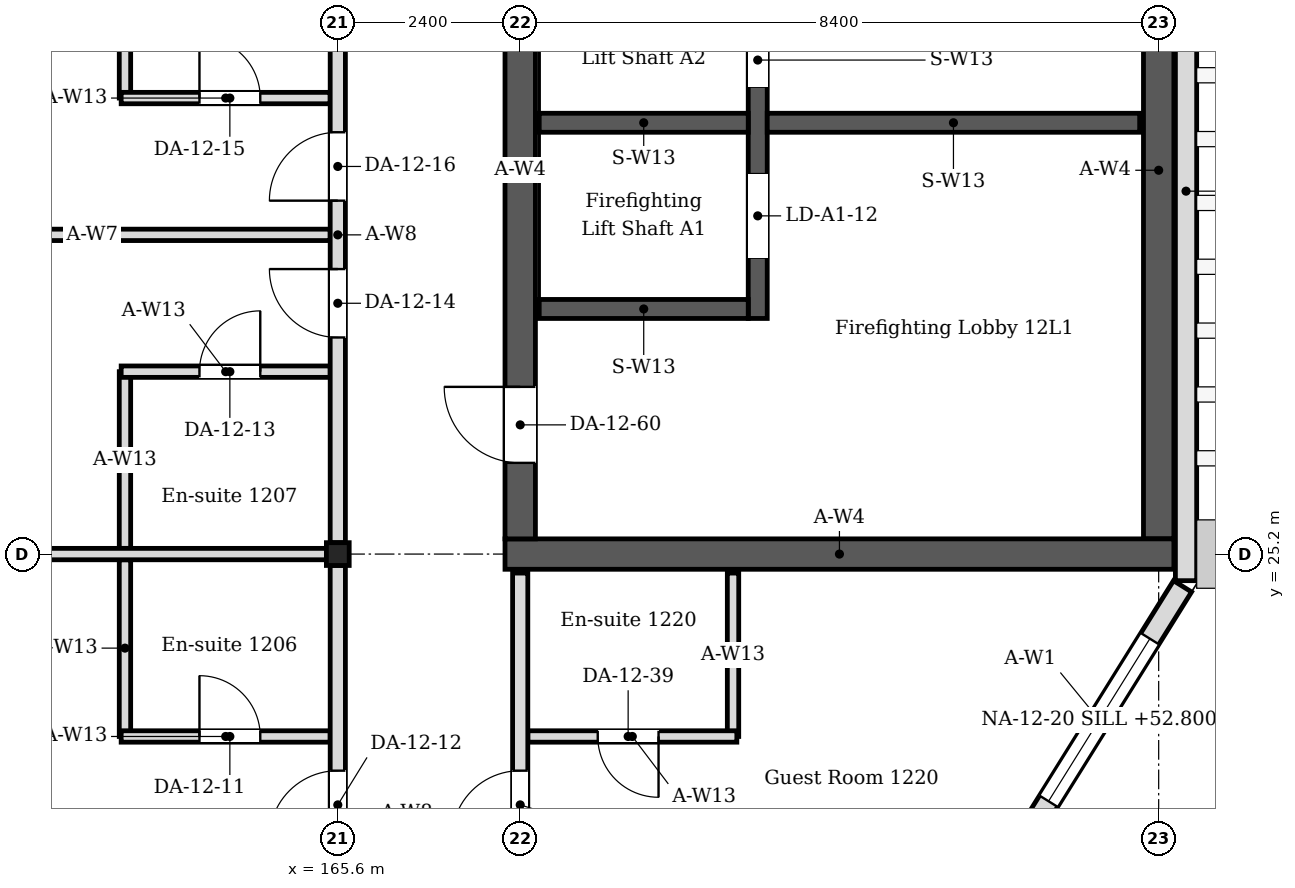
"""IFC4 building model, lengths in metres.
Left out: names, types, materials, properties, quantities, classifications, styles, units other than length and angle.
Written with IfcOpenShell. Run it as: python <this file> out.ifc"""

import sys

from ifc_helpers import new_model, si_unit, direction, frame, frame_2d, origin, origin_2d, place, context, subcontext, project, spatial, rectangle, i_section, extrude, element, fill, save


model = new_model("IFC4")
c1 = context("Model", 3, precision=1e-05, world=origin(), true_north=direction((0.0, 1.0)))
c2 = subcontext(c1, "Body", "Model", "MODEL_VIEW")
j1 = project(units=[si_unit("LENGTHUNIT", "METRE"), si_unit("PLANEANGLEUNIT", "RADIAN")], contexts=[c1])
p1 = place(None, origin())
s1 = spatial("IfcSite", under=j1, at=p1, CompositionType="ELEMENT")
p2 = place(p1, origin())
s2 = spatial("IfcBuilding", under=s1, at=p2, CompositionType="ELEMENT")
p3 = place(p2, frame((0.0, 0.0, 52.2)))
s3 = spatial("IfcBuildingStorey", under=s2, at=p3, CompositionType="ELEMENT", Elevation=52.2)
p4 = place(p3, frame((165.6, 25.2, 0.0), z_axis=(0.0, 0.0, 1.0), x_axis=(1.0, 0.0, 0.0)))
e1 = element("IfcColumn", 1, at=p4, inside=s3, PredefinedType="COLUMN", context=c2, shape_type="SweptSolid", body=[
    extrude(i_section(OverallWidth=0.3, OverallDepth=0.3, WebThickness=0.01, FlangeThickness=0.015, FilletRadius=0.013, at=origin_2d()), origin(), (0.0, 0.0, 1.0), 4.2),
])
p5 = place(p3, frame((167.8, 25.2, 0.0), z_axis=(0.0, 0.0, 1.0), x_axis=(1.0, 0.0, 0.0)))
e2 = element("IfcWall", 2, at=p5, inside=s3, PredefinedType="SOLIDWALL", context=c2, shape_type="SweptSolid", body=[
    extrude(rectangle(XDim=8.8, YDim=0.4, at=frame_2d((4.4, 0.0))), origin(), (0.0, 0.0, 1.0), 4.05),
])
p6 = place(p3, frame((168.0, 25.4, 0.0), z_axis=(0.0, 0.0, 1.0), x_axis=(0.0, 1.0, 0.0)))
e3 = element("IfcWall", 3, at=p6, inside=s3, PredefinedType="SOLIDWALL", context=c2, shape_type="SweptSolid", body=[
    extrude(rectangle(XDim=16.4, YDim=0.4, at=frame_2d((8.2, 0.0))), origin(), (0.0, 0.0, 1.0), 4.05),
])
p7 = place(p6, frame((1.0, 0.0, 0.0)))
e4 = element("IfcOpeningElement", 4, at=p7, cuts=e3, PredefinedType="OPENING", context=c2, shape_type="SweptSolid", body=[
    extrude(rectangle(XDim=1.0, YDim=2.1, at=frame_2d((0.5, 1.05))), frame((0.0, 0.21, 0.0), z_axis=(0.0, -1.0, 0.0), x_axis=(1.0, 0.0, 0.0)), (0.0, 0.0, 1.0), 0.42),
])
p8 = place(p6, frame((14.4, 0.0, 0.0)))
e5 = element("IfcOpeningElement", 5, at=p8, cuts=e3, PredefinedType="OPENING", context=c2, shape_type="SweptSolid", body=[
    extrude(rectangle(XDim=1.4, YDim=2.1, at=frame_2d((0.7, 1.05))), frame((0.0, 0.21, 0.0), z_axis=(0.0, -1.0, 0.0), x_axis=(1.0, 0.0, 0.0)), (0.0, 0.0, 1.0), 0.42),
])
p9 = place(p3, frame((176.4, 25.4, 0.0), z_axis=(0.0, 0.0, 1.0), x_axis=(0.0, 1.0, 0.0)))
e6 = element("IfcWall", 6, at=p9, inside=s3, PredefinedType="SOLIDWALL", context=c2, shape_type="SweptSolid", body=[
    extrude(rectangle(XDim=16.4, YDim=0.4, at=frame_2d((8.2, 0.0))), origin(), (0.0, 0.0, 1.0), 4.05),
])
p10 = place(p3, frame((174.521, 21.259, 0.0), z_axis=(0.0, 0.0, 1.0), x_axis=(0.529018946142, 0.848610013271, 0.0)))
e7 = element("IfcWall", 7, at=p10, inside=s3, PredefinedType="SOLIDWALL", context=c2, shape_type="SweptSolid", body=[
    extrude(rectangle(XDim=4.144, YDim=0.28, at=frame_2d((2.072, 0.0))), origin(), (0.0, 0.0, 1.0), 4.05),
])
p11 = place(p10, frame((0.812, 0.0, 0.6)))
e8 = element("IfcOpeningElement", 8, at=p11, cuts=e7, PredefinedType="OPENING", context=c2, shape_type="SweptSolid", body=[
    extrude(rectangle(XDim=2.52, YDim=2.4, at=frame_2d((1.26, 1.2))), frame((0.0, 0.15, 0.0), z_axis=(0.0, -1.0, 0.0), x_axis=(1.0, 0.0, 0.0)), (0.0, 0.0, 1.0), 0.3),
])
p12 = place(p3, frame((176.76, 24.85, 0.0), z_axis=(0.0, 0.0, 1.0), x_axis=(0.0, 1.0, 0.0)))
e9 = element("IfcWall", 9, at=p12, inside=s3, PredefinedType="SOLIDWALL", context=c2, shape_type="SweptSolid", body=[
    extrude(rectangle(XDim=42.57, YDim=0.28, at=frame_2d((21.285, 0.0))), origin(), (0.0, 0.0, 1.0), 4.05),
])
p13 = place(p12, frame((17.99, 0.0, 0.6)))
e10 = element("IfcOpeningElement", 10, at=p13, cuts=e9, PredefinedType="OPENING", context=c2, shape_type="SweptSolid", body=[
    extrude(rectangle(XDim=2.52, YDim=2.4, at=frame_2d((1.26, 1.2))), frame((0.0, 0.15, 0.0), z_axis=(0.0, -1.0, 0.0), x_axis=(1.0, 0.0, 0.0)), (0.0, 0.0, 1.0), 0.3),
])
p14 = place(p12, frame((22.19, 0.0, 0.6)))
e11 = element("IfcOpeningElement", 11, at=p14, cuts=e9, PredefinedType="OPENING", context=c2, shape_type="SweptSolid", body=[
    extrude(rectangle(XDim=2.52, YDim=2.4, at=frame_2d((1.26, 1.2))), frame((0.0, 0.15, 0.0), z_axis=(0.0, -1.0, 0.0), x_axis=(1.0, 0.0, 0.0)), (0.0, 0.0, 1.0), 0.3),
])
p15 = place(p12, frame((25.97, 0.0, 0.6)))
e12 = element("IfcOpeningElement", 12, at=p15, cuts=e9, PredefinedType="OPENING", context=c2, shape_type="SweptSolid", body=[
    extrude(rectangle(XDim=2.52, YDim=2.4, at=frame_2d((1.26, 1.2))), frame((0.0, 0.15, 0.0), z_axis=(0.0, -1.0, 0.0), x_axis=(1.0, 0.0, 0.0)), (0.0, 0.0, 1.0), 0.3),
])
p16 = place(p12, frame((30.17, 0.0, 0.45)))
e13 = element("IfcOpeningElement", 13, at=p16, cuts=e9, PredefinedType="OPENING", context=c2, shape_type="SweptSolid", body=[
    extrude(rectangle(XDim=2.52, YDim=2.1, at=frame_2d((1.26, 1.05))), frame((0.0, 0.15, 0.0), z_axis=(0.0, -1.0, 0.0), x_axis=(1.0, 0.0, 0.0)), (0.0, 0.0, 1.0), 0.3),
])
p17 = place(p3, frame((162.8, 22.8, 0.0), z_axis=(0.0, 0.0, 1.0), x_axis=(0.0, 1.0, 0.0)))
e14 = element("IfcWall", 14, at=p17, inside=s3, PredefinedType="PARTITIONING", context=c2, shape_type="SweptSolid", body=[
    extrude(rectangle(XDim=2.325, YDim=0.15, at=frame_2d((1.163, 0.0))), origin(), (0.0, 0.0, 1.0), 4.05),
])
p18 = place(p3, frame((162.75, 22.8, 0.0), z_axis=(0.0, 0.0, 1.0), x_axis=(1.0, 0.0, 0.0)))
e15 = element("IfcWall", 15, at=p18, inside=s3, PredefinedType="PARTITIONING", context=c2, shape_type="SweptSolid", body=[
    extrude(rectangle(XDim=2.75, YDim=0.15, at=frame_2d((1.375, 0.0))), origin(), (0.0, 0.0, 1.0), 4.05),
])
p19 = place(p18, frame((1.03, 0.0, 0.0)))
e16 = element("IfcOpeningElement", 16, at=p19, cuts=e15, PredefinedType="OPENING", context=c2, shape_type="SweptSolid", body=[
    extrude(rectangle(XDim=0.8, YDim=2.1, at=frame_2d((0.4, 1.05))), frame((0.0, 0.085, 0.0), z_axis=(0.0, -1.0, 0.0), x_axis=(1.0, 0.0, 0.0)), (0.0, 0.0, 1.0), 0.17),
])
p20 = place(p3, frame((162.8, 25.275, 0.0), z_axis=(0.0, 0.0, 1.0), x_axis=(0.0, 1.0, 0.0)))
e17 = element("IfcWall", 17, at=p20, inside=s3, PredefinedType="PARTITIONING", context=c2, shape_type="SweptSolid", body=[
    extrude(rectangle(XDim=2.325, YDim=0.15, at=frame_2d((1.163, 0.0))), origin(), (0.0, 0.0, 1.0), 4.05),
])
p21 = place(p3, frame((162.75, 27.6, 0.0), z_axis=(0.0, 0.0, 1.0), x_axis=(1.0, 0.0, 0.0)))
e18 = element("IfcWall", 18, at=p21, inside=s3, PredefinedType="PARTITIONING", context=c2, shape_type="SweptSolid", body=[
    extrude(rectangle(XDim=2.75, YDim=0.15, at=frame_2d((1.375, 0.0))), origin(), (0.0, 0.0, 1.0), 4.05),
])
p22 = place(p21, frame((1.03, 0.0, 0.0)))
e19 = element("IfcOpeningElement", 19, at=p22, cuts=e18, PredefinedType="OPENING", context=c2, shape_type="SweptSolid", body=[
    extrude(rectangle(XDim=0.8, YDim=2.1, at=frame_2d((0.4, 1.05))), frame((0.0, 0.085, 0.0), z_axis=(0.0, -1.0, 0.0), x_axis=(1.0, 0.0, 0.0)), (0.0, 0.0, 1.0), 0.17),
])
p23 = place(p3, frame((162.8, 31.2, 0.0), z_axis=(0.0, 0.0, 1.0), x_axis=(0.0, 1.0, 0.0)))
e20 = element("IfcWall", 20, at=p23, inside=s3, PredefinedType="PARTITIONING", context=c2, shape_type="SweptSolid", body=[
    extrude(rectangle(XDim=2.325, YDim=0.15, at=frame_2d((1.163, 0.0))), origin(), (0.0, 0.0, 1.0), 4.05),
])
p24 = place(p3, frame((162.75, 31.2, 0.0), z_axis=(0.0, 0.0, 1.0), x_axis=(1.0, 0.0, 0.0)))
e21 = element("IfcWall", 21, at=p24, inside=s3, PredefinedType="PARTITIONING", context=c2, shape_type="SweptSolid", body=[
    extrude(rectangle(XDim=2.75, YDim=0.15, at=frame_2d((1.375, 0.0))), origin(), (0.0, 0.0, 1.0), 4.05),
])
p25 = place(p24, frame((1.03, 0.0, 0.0)))
e22 = element("IfcOpeningElement", 22, at=p25, cuts=e21, PredefinedType="OPENING", context=c2, shape_type="SweptSolid", body=[
    extrude(rectangle(XDim=0.8, YDim=2.1, at=frame_2d((0.4, 1.05))), frame((0.0, 0.085, 0.0), z_axis=(0.0, -1.0, 0.0), x_axis=(1.0, 0.0, 0.0)), (0.0, 0.0, 1.0), 0.17),
])
p26 = place(p3, frame((170.8, 22.8, 0.0), z_axis=(0.0, 0.0, 1.0), x_axis=(0.0, 1.0, 0.0)))
e23 = element("IfcWall", 23, at=p26, inside=s3, PredefinedType="PARTITIONING", context=c2, shape_type="SweptSolid", body=[
    extrude(rectangle(XDim=2.15, YDim=0.15, at=frame_2d((1.075, 0.0))), origin(), (0.0, 0.0, 1.0), 4.05),
])
p27 = place(p3, frame((170.85, 22.8, 0.0), z_axis=(0.0, 0.0, 1.0), x_axis=(-1.0, 0.0, 0.0)))
e24 = element("IfcWall", 24, at=p27, inside=s3, PredefinedType="PARTITIONING", context=c2, shape_type="SweptSolid", body=[
    extrude(rectangle(XDim=2.75, YDim=0.15, at=frame_2d((1.375, 0.0))), origin(), (0.0, 0.0, 1.0), 4.05),
])
p28 = place(p27, frame((1.03, 0.0, 0.0)))
e25 = element("IfcOpeningElement", 25, at=p28, cuts=e24, PredefinedType="OPENING", context=c2, shape_type="SweptSolid", body=[
    extrude(rectangle(XDim=0.8, YDim=2.1, at=frame_2d((0.4, 1.05))), frame((0.0, 0.085, 0.0), z_axis=(0.0, -1.0, 0.0), x_axis=(1.0, 0.0, 0.0)), (0.0, 0.0, 1.0), 0.17),
])
p29 = place(p3, frame((157.35, 25.2, 0.0), z_axis=(0.0, 0.0, 1.0), x_axis=(1.0, 0.0, 0.0)))
e26 = element("IfcWall", 26, at=p29, inside=s3, PredefinedType="PARTITIONING", context=c2, shape_type="SweptSolid", body=[
    extrude(rectangle(XDim=8.1, YDim=0.15, at=frame_2d((4.05, 0.0))), origin(), (0.0, 0.0, 1.0), 3.604),
])
p30 = place(p3, frame((159.24, 29.4, 0.0), z_axis=(0.0, 0.0, 1.0), x_axis=(1.0, 0.0, 0.0)))
e27 = element("IfcWall", 27, at=p30, inside=s3, PredefinedType="PARTITIONING", context=c2, shape_type="SweptSolid", body=[
    extrude(rectangle(XDim=6.26, YDim=0.15, at=frame_2d((3.13, 0.0))), origin(), (0.0, 0.0, 1.0), 3.604),
])
p31 = place(p3, frame((165.6, 16.95, 0.0), z_axis=(0.0, 0.0, 1.0), x_axis=(0.0, 1.0, 0.0)))
e28 = element("IfcWall", 28, at=p31, inside=s3, PredefinedType="PARTITIONING", context=c2, shape_type="SweptSolid", body=[
    extrude(rectangle(XDim=8.1, YDim=0.2, at=frame_2d((4.05, 0.0))), origin(), (0.0, 0.0, 1.0), 3.45),
])
p32 = place(p31, frame((2.7, 0.0, 0.0)))
e29 = element("IfcOpeningElement", 29, at=p32, cuts=e28, PredefinedType="OPENING", context=c2, shape_type="SweptSolid", body=[
    extrude(rectangle(XDim=0.9, YDim=2.1, at=frame_2d((0.45, 1.05))), frame((0.0, 0.11, 0.0), z_axis=(0.0, -1.0, 0.0), x_axis=(1.0, 0.0, 0.0)), (0.0, 0.0, 1.0), 0.22),
])
p33 = place(p31, frame((4.5, 0.0, 0.0)))
e30 = element("IfcOpeningElement", 30, at=p33, cuts=e28, PredefinedType="OPENING", context=c2, shape_type="SweptSolid", body=[
    extrude(rectangle(XDim=0.9, YDim=2.1, at=frame_2d((0.45, 1.05))), frame((0.0, 0.11, 0.0), z_axis=(0.0, -1.0, 0.0), x_axis=(1.0, 0.0, 0.0)), (0.0, 0.0, 1.0), 0.22),
])
p34 = place(p3, frame((165.6, 25.35, 0.0), z_axis=(0.0, 0.0, 1.0), x_axis=(0.0, 1.0, 0.0)))
e31 = element("IfcWall", 31, at=p34, inside=s3, PredefinedType="PARTITIONING", context=c2, shape_type="SweptSolid", body=[
    extrude(rectangle(XDim=8.1, YDim=0.2, at=frame_2d((4.05, 0.0))), origin(), (0.0, 0.0, 1.0), 3.45),
])
p35 = place(p34, frame((2.7, 0.0, 0.0)))
e32 = element("IfcOpeningElement", 32, at=p35, cuts=e31, PredefinedType="OPENING", context=c2, shape_type="SweptSolid", body=[
    extrude(rectangle(XDim=0.9, YDim=2.1, at=frame_2d((0.45, 1.05))), frame((0.0, 0.11, 0.0), z_axis=(0.0, -1.0, 0.0), x_axis=(1.0, 0.0, 0.0)), (0.0, 0.0, 1.0), 0.22),
])
p36 = place(p34, frame((4.5, 0.0, 0.0)))
e33 = element("IfcOpeningElement", 33, at=p36, cuts=e31, PredefinedType="OPENING", context=c2, shape_type="SweptSolid", body=[
    extrude(rectangle(XDim=0.9, YDim=2.1, at=frame_2d((0.45, 1.05))), frame((0.0, 0.11, 0.0), z_axis=(0.0, -1.0, 0.0), x_axis=(1.0, 0.0, 0.0)), (0.0, 0.0, 1.0), 0.22),
])
p37 = place(p3, frame((168.0, 16.95, 0.0), z_axis=(0.0, 0.0, 1.0), x_axis=(0.0, 1.0, 0.0)))
e34 = element("IfcWall", 34, at=p37, inside=s3, PredefinedType="PARTITIONING", context=c2, shape_type="SweptSolid", body=[
    extrude(rectangle(XDim=8.0, YDim=0.2, at=frame_2d((4.0, 0.0))), origin(), (0.0, 0.0, 1.0), 3.45),
])
p38 = place(p37, frame((2.7, 0.0, 0.0)))
e35 = element("IfcOpeningElement", 35, at=p38, cuts=e34, PredefinedType="OPENING", context=c2, shape_type="SweptSolid", body=[
    extrude(rectangle(XDim=0.9, YDim=2.1, at=frame_2d((0.45, 1.05))), frame((0.0, 0.11, 0.0), z_axis=(0.0, -1.0, 0.0), x_axis=(1.0, 0.0, 0.0)), (0.0, 0.0, 1.0), 0.22),
])
p39 = place(p37, frame((4.5, 0.0, 0.0)))
e36 = element("IfcOpeningElement", 36, at=p39, cuts=e34, PredefinedType="OPENING", context=c2, shape_type="SweptSolid", body=[
    extrude(rectangle(XDim=0.9, YDim=2.1, at=frame_2d((0.45, 1.05))), frame((0.0, 0.11, 0.0), z_axis=(0.0, -1.0, 0.0), x_axis=(1.0, 0.0, 0.0)), (0.0, 0.0, 1.0), 0.22),
])
p40 = place(p3, frame((171.125, 28.3, 0.0), z_axis=(0.0, 0.0, 1.0), x_axis=(0.0, 1.0, 0.0)))
e37 = element("IfcWall", 37, at=p40, inside=s3, PredefinedType="SOLIDWALL", context=c2, shape_type="SweptSolid", body=[
    extrude(rectangle(XDim=10.9, YDim=0.25, at=frame_2d((5.45, 0.0))), origin(), (0.0, 0.0, 1.0), 4.05),
])
p41 = place(p40, frame((0.8, 0.0, 0.0)))
e38 = element("IfcOpeningElement", 38, at=p41, cuts=e37, PredefinedType="OPENING", context=c2, shape_type="SweptSolid", body=[
    extrude(rectangle(XDim=1.1, YDim=2.1, at=frame_2d((0.55, 1.05))), frame((0.0, 0.135, 0.0), z_axis=(0.0, -1.0, 0.0), x_axis=(1.0, 0.0, 0.0)), (0.0, 0.0, 1.0), 0.27),
])
p42 = place(p40, frame((3.05, 0.0, 0.0)))
e39 = element("IfcOpeningElement", 39, at=p42, cuts=e37, PredefinedType="OPENING", context=c2, shape_type="SweptSolid", body=[
    extrude(rectangle(XDim=1.1, YDim=2.1, at=frame_2d((0.55, 1.05))), frame((0.0, 0.135, 0.0), z_axis=(0.0, -1.0, 0.0), x_axis=(1.0, 0.0, 0.0)), (0.0, 0.0, 1.0), 0.27),
])
p43 = place(p40, frame((5.1, 0.0, 0.0)))
e40 = element("IfcOpeningElement", 40, at=p43, cuts=e37, PredefinedType="OPENING", context=c2, shape_type="SweptSolid", body=[
    extrude(rectangle(XDim=1.1, YDim=2.1, at=frame_2d((0.55, 1.05))), frame((0.0, 0.135, 0.0), z_axis=(0.0, -1.0, 0.0), x_axis=(1.0, 0.0, 0.0)), (0.0, 0.0, 1.0), 0.27),
])
p44 = place(p40, frame((7.15, 0.0, 0.0)))
e41 = element("IfcOpeningElement", 41, at=p44, cuts=e37, PredefinedType="OPENING", context=c2, shape_type="SweptSolid", body=[
    extrude(rectangle(XDim=1.1, YDim=2.1, at=frame_2d((0.55, 1.05))), frame((0.0, 0.135, 0.0), z_axis=(0.0, -1.0, 0.0), x_axis=(1.0, 0.0, 0.0)), (0.0, 0.0, 1.0), 0.27),
])
p45 = place(p40, frame((9.2, 0.0, 0.0)))
e42 = element("IfcOpeningElement", 42, at=p45, cuts=e37, PredefinedType="OPENING", context=c2, shape_type="SweptSolid", body=[
    extrude(rectangle(XDim=1.1, YDim=2.1, at=frame_2d((0.55, 1.05))), frame((0.0, 0.135, 0.0), z_axis=(0.0, -1.0, 0.0), x_axis=(1.0, 0.0, 0.0)), (0.0, 0.0, 1.0), 0.27),
])
for number, where, z_axis, x_axis in (
    (43, (168.25, 28.425, 0.0), (0.0, 0.0, 1.0), (1.0, 0.0, 0.0)),
    (44, (168.25, 30.875, 0.0), (0.0, 0.0, 1.0), (1.0, 0.0, 0.0)),
):
    element("IfcWall", number, at=place(p3, frame(where, z_axis=z_axis, x_axis=x_axis)), inside=s3, PredefinedType="SOLIDWALL", context=c2, shape_type="SweptSolid", body=[
        extrude(rectangle(XDim=2.75, YDim=0.25, at=frame_2d((1.375, 0.0))), origin(), (0.0, 0.0, 1.0), 4.05),
    ])
p46 = place(p3, frame((171.25, 30.875, 0.0), z_axis=(0.0, 0.0, 1.0), x_axis=(1.0, 0.0, 0.0)))
e45 = element("IfcWall", 45, at=p46, inside=s3, PredefinedType="SOLIDWALL", context=c2, shape_type="SweptSolid", body=[
    extrude(rectangle(XDim=4.9, YDim=0.25, at=frame_2d((2.45, 0.0))), origin(), (0.0, 0.0, 1.0), 4.05),
])
p47 = place(p11, origin())
e46 = element("IfcWindow", 46, at=p47, inside=s3, PartitioningType="SINGLE_PANEL", PredefinedType="WINDOW", context=c2, shape_type="SweptSolid", body=[
    extrude(rectangle(XDim=2.52, YDim=2.4, at=frame_2d((1.26, 1.2))), frame((0.0, 0.03, 0.0), z_axis=(0.0, -1.0, 0.0), x_axis=(1.0, 0.0, 0.0)), (0.0, 0.0, 1.0), 0.06),
])
fill(e8, e46)
p48 = place(p19, origin())
e47 = element("IfcDoor", 47, at=p48, inside=s3, OperationType="SINGLE_SWING_LEFT", PredefinedType="DOOR", context=c2, shape_type="SweptSolid", body=[
    extrude(rectangle(XDim=0.8, YDim=2.1, at=frame_2d((0.4, 1.05))), frame((0.0, 0.025, 0.0), z_axis=(0.0, -1.0, 0.0), x_axis=(1.0, 0.0, 0.0)), (0.0, 0.0, 1.0), 0.05),
])
fill(e16, e47)
p49 = place(p33, origin())
e48 = element("IfcDoor", 48, at=p49, inside=s3, OperationType="SINGLE_SWING_LEFT", PredefinedType="DOOR", context=c2, shape_type="SweptSolid", body=[
    extrude(rectangle(XDim=0.9, YDim=2.1, at=frame_2d((0.45, 1.05))), frame((0.0, 0.025, 0.0), z_axis=(0.0, -1.0, 0.0), x_axis=(1.0, 0.0, 0.0)), (0.0, 0.0, 1.0), 0.05),
])
fill(e30, e48)
p50 = place(p22, origin())
e49 = element("IfcDoor", 49, at=p50, inside=s3, OperationType="SINGLE_SWING_RIGHT", PredefinedType="DOOR", context=c2, shape_type="SweptSolid", body=[
    extrude(rectangle(XDim=0.8, YDim=2.1, at=frame_2d((0.4, 1.05))), frame((0.0, 0.025, 0.0), z_axis=(0.0, -1.0, 0.0), x_axis=(1.0, 0.0, 0.0)), (0.0, 0.0, 1.0), 0.05),
])
fill(e19, e49)
p51 = place(p35, origin())
e50 = element("IfcDoor", 50, at=p51, inside=s3, OperationType="SINGLE_SWING_RIGHT", PredefinedType="DOOR", context=c2, shape_type="SweptSolid", body=[
    extrude(rectangle(XDim=0.9, YDim=2.1, at=frame_2d((0.45, 1.05))), frame((0.0, 0.025, 0.0), z_axis=(0.0, -1.0, 0.0), x_axis=(1.0, 0.0, 0.0)), (0.0, 0.0, 1.0), 0.05),
])
fill(e32, e50)
p52 = place(p25, origin())
e51 = element("IfcDoor", 51, at=p52, inside=s3, OperationType="SINGLE_SWING_LEFT", PredefinedType="DOOR", context=c2, shape_type="SweptSolid", body=[
    extrude(rectangle(XDim=0.8, YDim=2.1, at=frame_2d((0.4, 1.05))), frame((0.0, 0.025, 0.0), z_axis=(0.0, -1.0, 0.0), x_axis=(1.0, 0.0, 0.0)), (0.0, 0.0, 1.0), 0.05),
])
fill(e22, e51)
p53 = place(p36, origin())
e52 = element("IfcDoor", 52, at=p53, inside=s3, OperationType="SINGLE_SWING_LEFT", PredefinedType="DOOR", context=c2, shape_type="SweptSolid", body=[
    extrude(rectangle(XDim=0.9, YDim=2.1, at=frame_2d((0.45, 1.05))), frame((0.0, 0.025, 0.0), z_axis=(0.0, -1.0, 0.0), x_axis=(1.0, 0.0, 0.0)), (0.0, 0.0, 1.0), 0.05),
])
fill(e33, e52)
p54 = place(p28, origin())
e53 = element("IfcDoor", 53, at=p54, inside=s3, OperationType="SINGLE_SWING_LEFT", PredefinedType="DOOR", context=c2, shape_type="SweptSolid", body=[
    extrude(rectangle(XDim=0.8, YDim=2.1, at=frame_2d((0.4, 1.05))), frame((0.0, 0.025, 0.0), z_axis=(0.0, -1.0, 0.0), x_axis=(1.0, 0.0, 0.0)), (0.0, 0.0, 1.0), 0.05),
])
fill(e25, e53)
p55 = place(p39, origin())
e54 = element("IfcDoor", 54, at=p55, inside=s3, OperationType="SINGLE_SWING_LEFT", PredefinedType="DOOR", context=c2, shape_type="SweptSolid", body=[
    extrude(rectangle(XDim=0.9, YDim=2.1, at=frame_2d((0.45, 1.05))), frame((0.0, 0.025, 0.0), z_axis=(0.0, -1.0, 0.0), x_axis=(1.0, 0.0, 0.0)), (0.0, 0.0, 1.0), 0.05),
])
fill(e36, e54)
p56 = place(p41, origin())
e55 = element("IfcDoor", 55, at=p56, inside=s3, OperationType="SLIDING_TO_LEFT", PredefinedType="DOOR", context=c2, shape_type="SweptSolid", body=[
    extrude(rectangle(XDim=1.1, YDim=2.1, at=frame_2d((0.55, 1.05))), frame((0.0, 0.025, 0.0), z_axis=(0.0, -1.0, 0.0), x_axis=(1.0, 0.0, 0.0)), (0.0, 0.0, 1.0), 0.05),
])
fill(e38, e55)
p57 = place(p42, origin())
e56 = element("IfcDoor", 56, at=p57, inside=s3, OperationType="SLIDING_TO_LEFT", PredefinedType="DOOR", context=c2, shape_type="SweptSolid", body=[
    extrude(rectangle(XDim=1.1, YDim=2.1, at=frame_2d((0.55, 1.05))), frame((0.0, 0.025, 0.0), z_axis=(0.0, -1.0, 0.0), x_axis=(1.0, 0.0, 0.0)), (0.0, 0.0, 1.0), 0.05),
])
fill(e39, e56)
p58 = place(p7, origin())
e57 = element("IfcDoor", 57, at=p58, inside=s3, OperationType="SINGLE_SWING_RIGHT", PredefinedType="DOOR", context=c2, shape_type="SweptSolid", body=[
    extrude(rectangle(XDim=1.0, YDim=2.1, at=frame_2d((0.5, 1.05))), frame((0.0, 0.025, 0.0), z_axis=(0.0, -1.0, 0.0), x_axis=(1.0, 0.0, 0.0)), (0.0, 0.0, 1.0), 0.05),
])
fill(e4, e57)
save(model, sys.argv[1])
